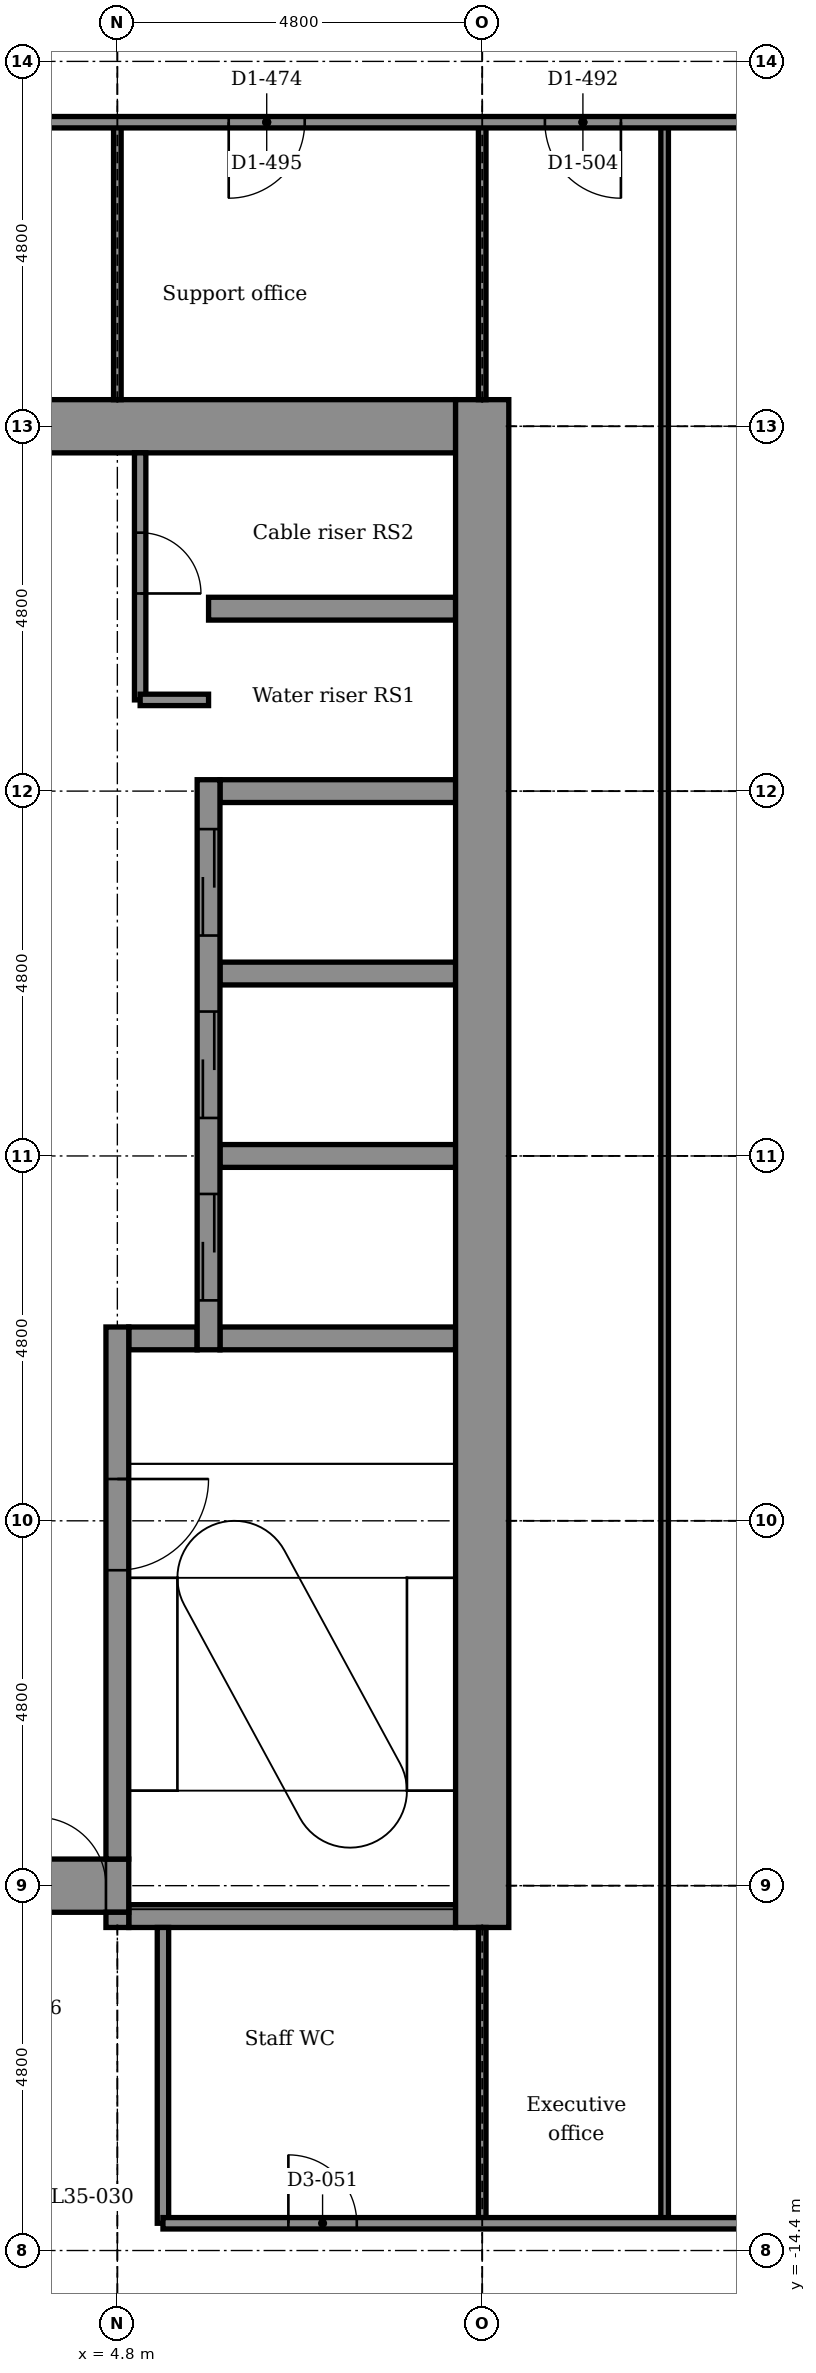
"""IFC4 building model, lengths in metres.
Left out: names, types, materials, properties, quantities, classifications, styles, units other than length and angle.
Written with IfcOpenShell. Run it as: python <this file> out.ifc"""

import sys

from ifc_helpers import new_model, si_unit, direction, frame, frame_2d, origin, place, context, subcontext, project, spatial, rectangle, extrude, element, fill, save


model = new_model("IFC4")
c1 = context("Model", 3, precision=1e-05, world=origin(), true_north=direction((0.0, 1.0)))
c2 = subcontext(c1, "Body", "Model", "MODEL_VIEW")
j1 = project(units=[si_unit("LENGTHUNIT", "METRE"), si_unit("PLANEANGLEUNIT", "RADIAN")], contexts=[c1])
p1 = place(None, origin())
s1 = spatial("IfcSite", under=j1, at=p1, CompositionType="ELEMENT")
p2 = place(p1, origin())
s2 = spatial("IfcBuilding", under=s1, at=p2, CompositionType="ELEMENT")
p3 = place(p2, frame((0.0, 0.0, 170.0)))
s3 = spatial("IfcBuildingStorey", under=s2, at=p3, CompositionType="ELEMENT", Elevation=170.0)
p4 = place(p3, frame((4.95, -10.0, -0.15), z_axis=(0.0, 0.0, 1.0), x_axis=(1.0, 0.0, 0.0)))
e1 = element("IfcWall", 1, at=p4, inside=s3, PredefinedType="STANDARD", context=c2, shape_type="SweptSolid", body=[
    extrude(rectangle(XDim=4.3, YDim=0.3, at=frame_2d((2.15, 0.0))), origin(), (0.0, 0.0, 1.0), 3.9),
])
p5 = place(p3, frame((-5.25, -9.6, -0.15), z_axis=(0.0, 0.0, 1.0), x_axis=(1.0, 0.0, 0.0)))
e2 = element("IfcWall", 2, at=p5, inside=s3, PredefinedType="SHEAR", context=c2, shape_type="SweptSolid", body=[
    extrude(rectangle(XDim=10.2, YDim=0.7, at=frame_2d((5.1, 0.0))), origin(), (0.0, 0.0, 1.0), 3.9),
])
p6 = place(p5, frame((9.0, 0.0, 0.15)))
e3 = element("IfcOpeningElement", 3, at=p6, cuts=e2, PredefinedType="OPENING", context=c2, shape_type="SweptSolid", body=[
    extrude(rectangle(XDim=0.9, YDim=2.1, at=frame_2d((0.45, 1.05))), frame((0.0, 0.36, 0.0), z_axis=(0.0, -1.0, 0.0), x_axis=(1.0, 0.0, 0.0)), (0.0, 0.0, 1.0), 0.72),
])
p7 = place(p3, frame((4.95, -2.4, -0.15), z_axis=(0.0, 0.0, 1.0), x_axis=(1.0, 0.0, 0.0)))
e4 = element("IfcWall", 4, at=p7, inside=s3, PredefinedType="STANDARD", context=c2, shape_type="SweptSolid", body=[
    extrude(rectangle(XDim=0.9, YDim=0.3, at=frame_2d((0.45, 0.0))), origin(), (0.0, 0.0, 1.0), 3.9),
])
for number, where, z_axis, x_axis in (
    (5, (6.15, -2.4, -0.15), (0.0, 0.0, 1.0), (1.0, 0.0, 0.0)),
    (6, (6.15, 0.0, -0.15), (0.0, 0.0, 1.0), (1.0, 0.0, 0.0)),
    (7, (6.15, 2.4, -0.15), (0.0, 0.0, 1.0), (1.0, 0.0, 0.0)),
    (8, (6.15, 4.8, -0.15), (0.0, 0.0, 1.0), (1.0, 0.0, 0.0)),
):
    element("IfcWall", number, at=place(p3, frame(where, z_axis=z_axis, x_axis=x_axis)), inside=s3, PredefinedType="STANDARD", context=c2, shape_type="SweptSolid", body=[
        extrude(rectangle(XDim=3.1, YDim=0.3, at=frame_2d((1.55, 0.0))), origin(), (0.0, 0.0, 1.0), 3.9),
    ])
p8 = place(p3, frame((6.0, 7.2, -0.15), z_axis=(0.0, 0.0, 1.0), x_axis=(1.0, 0.0, 0.0)))
e9 = element("IfcWall", 9, at=p8, inside=s3, PredefinedType="STANDARD", context=c2, shape_type="SweptSolid", body=[
    extrude(rectangle(XDim=3.25, YDim=0.3, at=frame_2d((1.625, 0.0))), origin(), (0.0, 0.0, 1.0), 3.9),
])
p9 = place(p3, frame((-5.25, 9.6, -0.15), z_axis=(0.0, 0.0, 1.0), x_axis=(1.0, 0.0, 0.0)))
e10 = element("IfcWall", 10, at=p9, inside=s3, PredefinedType="SHEAR", context=c2, shape_type="SweptSolid", body=[
    extrude(rectangle(XDim=14.5, YDim=0.7, at=frame_2d((7.25, 0.0))), origin(), (0.0, 0.0, 1.0), 3.9),
])
p10 = place(p9, frame((0.6, 0.0, 0.15)))
e11 = element("IfcOpeningElement", 11, at=p10, cuts=e10, PredefinedType="OPENING", context=c2, shape_type="SweptSolid", body=[
    extrude(rectangle(XDim=0.9, YDim=2.1, at=frame_2d((0.45, 1.05))), frame((0.0, 0.36, 0.0), z_axis=(0.0, -1.0, 0.0), x_axis=(1.0, 0.0, 0.0)), (0.0, 0.0, 1.0), 0.72),
])
p11 = place(p3, frame((4.8, -10.15, -0.15), z_axis=(0.0, 0.0, 1.0), x_axis=(0.0, 1.0, 0.0)))
e12 = element("IfcWall", 12, at=p11, inside=s3, PredefinedType="STANDARD", context=c2, shape_type="SweptSolid", body=[
    extrude(rectangle(XDim=0.2, YDim=0.3, at=frame_2d((0.1, 0.0))), origin(), (0.0, 0.0, 1.0), 3.9),
])
p12 = place(p3, frame((4.8, -9.25, -0.15), z_axis=(0.0, 0.0, 1.0), x_axis=(0.0, 1.0, 0.0)))
e13 = element("IfcWall", 13, at=p12, inside=s3, PredefinedType="STANDARD", context=c2, shape_type="SweptSolid", body=[
    extrude(rectangle(XDim=7.0, YDim=0.3, at=frame_2d((3.5, 0.0))), origin(), (0.0, 0.0, 1.0), 3.9),
])
p13 = place(p12, frame((3.8, 0.0, 0.15)))
e14 = element("IfcOpeningElement", 14, at=p13, cuts=e13, PredefinedType="OPENING", context=c2, shape_type="SweptSolid", body=[
    extrude(rectangle(XDim=1.2, YDim=2.1, at=frame_2d((0.6, 1.05))), frame((0.0, 0.16, 0.0), z_axis=(0.0, -1.0, 0.0), x_axis=(1.0, 0.0, 0.0)), (0.0, 0.0, 1.0), 0.32),
])
p14 = place(p3, frame((6.0, -2.55, -0.15), z_axis=(0.0, 0.0, 1.0), x_axis=(0.0, 1.0, 0.0)))
e15 = element("IfcWall", 15, at=p14, inside=s3, PredefinedType="STANDARD", context=c2, shape_type="SweptSolid", body=[
    extrude(rectangle(XDim=7.5, YDim=0.3, at=frame_2d((3.75, 0.0))), origin(), (0.0, 0.0, 1.0), 3.9),
])
p15 = place(p14, frame((0.65, 0.0, 0.15)))
e16 = element("IfcOpeningElement", 16, at=p15, cuts=e15, PredefinedType="OPENING", context=c2, shape_type="SweptSolid", body=[
    extrude(rectangle(XDim=1.4, YDim=2.1, at=frame_2d((0.7, 1.05))), frame((0.0, 0.16, 0.0), z_axis=(0.0, -1.0, 0.0), x_axis=(1.0, 0.0, 0.0)), (0.0, 0.0, 1.0), 0.32),
])
p16 = place(p14, frame((3.05, 0.0, 0.15)))
e17 = element("IfcOpeningElement", 17, at=p16, cuts=e15, PredefinedType="OPENING", context=c2, shape_type="SweptSolid", body=[
    extrude(rectangle(XDim=1.4, YDim=2.1, at=frame_2d((0.7, 1.05))), frame((0.0, 0.16, 0.0), z_axis=(0.0, -1.0, 0.0), x_axis=(1.0, 0.0, 0.0)), (0.0, 0.0, 1.0), 0.32),
])
p17 = place(p14, frame((5.45, 0.0, 0.15)))
e18 = element("IfcOpeningElement", 18, at=p17, cuts=e15, PredefinedType="OPENING", context=c2, shape_type="SweptSolid", body=[
    extrude(rectangle(XDim=1.4, YDim=2.1, at=frame_2d((0.7, 1.05))), frame((0.0, 0.16, 0.0), z_axis=(0.0, -1.0, 0.0), x_axis=(1.0, 0.0, 0.0)), (0.0, 0.0, 1.0), 0.32),
])
p18 = place(p3, frame((9.6, -10.15, -0.15), z_axis=(0.0, 0.0, 1.0), x_axis=(0.0, 1.0, 0.0)))
e19 = element("IfcWall", 19, at=p18, inside=s3, PredefinedType="SHEAR", context=c2, shape_type="SweptSolid", body=[
    extrude(rectangle(XDim=20.1, YDim=0.7, at=frame_2d((10.05, 0.0))), origin(), (0.0, 0.0, 1.0), 3.9),
])
p19 = place(p3, frame((12.0, -14.042, 0.0), z_axis=(0.0, 0.0, 1.0), x_axis=(0.0, 1.0, 0.0)))
e20 = element("IfcWall", 20, at=p19, inside=s3, PredefinedType="PARTITIONING", context=c2, shape_type="SweptSolid", body=[
    extrude(rectangle(XDim=27.642, YDim=0.1, at=frame_2d((13.821, 0.0))), origin(), (0.0, 0.0, 1.0), 3.75),
])
p20 = place(p3, frame((9.6, -14.042, 0.0), z_axis=(0.0, 0.0, 1.0), x_axis=(0.0, 1.0, 0.0)))
e21 = element("IfcWall", 21, at=p20, inside=s3, PredefinedType="PARTITIONING", context=c2, shape_type="SweptSolid", body=[
    extrude(rectangle(XDim=3.892, YDim=0.1, at=frame_2d((1.946, 0.0))), origin(), (0.0, 0.0, 1.0), 3.066),
])
p21 = place(p3, frame((9.6, 9.95, 0.0), z_axis=(0.0, 0.0, 1.0), x_axis=(0.0, 1.0, 0.0)))
e22 = element("IfcWall", 22, at=p21, inside=s3, PredefinedType="PARTITIONING", context=c2, shape_type="SweptSolid", body=[
    extrude(rectangle(XDim=3.65, YDim=0.1, at=frame_2d((1.825, 0.0))), origin(), (0.0, 0.0, 1.0), 3.066),
])
p22 = place(p3, frame((5.4, -14.042, 0.0), z_axis=(0.0, 0.0, 1.0), x_axis=(0.0, 1.0, 0.0)))
e23 = element("IfcWall", 23, at=p22, inside=s3, PredefinedType="PARTITIONING", context=c2, shape_type="SweptSolid", body=[
    extrude(rectangle(XDim=3.892, YDim=0.15, at=frame_2d((1.946, 0.0))), origin(), (0.0, 0.0, 1.0), 3.75),
])
p23 = place(p3, frame((5.1, 6.0, 0.0), z_axis=(0.0, 0.0, 1.0), x_axis=(0.0, 1.0, 0.0)))
e24 = element("IfcWall", 24, at=p23, inside=s3, PredefinedType="PARTITIONING", context=c2, shape_type="SweptSolid", body=[
    extrude(rectangle(XDim=3.25, YDim=0.15, at=frame_2d((1.625, 0.0))), origin(), (0.0, 0.0, 1.0), 3.75),
])
p24 = place(p23, frame((1.4, 0.0, 0.0)))
e25 = element("IfcOpeningElement", 25, at=p24, cuts=e24, PredefinedType="OPENING", context=c2, shape_type="SweptSolid", body=[
    extrude(rectangle(XDim=0.8, YDim=2.1, at=frame_2d((0.4, 1.05))), frame((0.0, 0.085, 0.0), z_axis=(0.0, -1.0, 0.0), x_axis=(1.0, 0.0, 0.0)), (0.0, 0.0, 1.0), 0.17),
])
p25 = place(p3, frame((4.8, 9.95, 0.0), z_axis=(0.0, 0.0, 1.0), x_axis=(0.0, 1.0, 0.0)))
e26 = element("IfcWall", 26, at=p25, inside=s3, PredefinedType="PARTITIONING", context=c2, shape_type="SweptSolid", body=[
    extrude(rectangle(XDim=3.65, YDim=0.1, at=frame_2d((1.825, 0.0))), origin(), (0.0, 0.0, 1.0), 3.066),
])
p26 = place(p3, frame((5.4, -14.042, 0.0), z_axis=(0.0, 0.0, 1.0), x_axis=(1.0, 0.0, 0.0)))
e27 = element("IfcWall", 27, at=p26, inside=s3, PredefinedType="PARTITIONING", context=c2, shape_type="SweptSolid", body=[
    extrude(rectangle(XDim=13.423, YDim=0.15, at=frame_2d((6.711, 0.0))), origin(), (0.0, 0.0, 1.0), 3.75),
])
p27 = place(p26, frame((1.65, 0.0, 0.0)))
e28 = element("IfcOpeningElement", 28, at=p27, cuts=e27, PredefinedType="OPENING", context=c2, shape_type="SweptSolid", body=[
    extrude(rectangle(XDim=0.9, YDim=2.1, at=frame_2d((0.45, 1.05))), frame((0.0, 0.085, 0.0), z_axis=(0.0, -1.0, 0.0), x_axis=(1.0, 0.0, 0.0)), (0.0, 0.0, 1.0), 0.17),
])
p28 = place(p3, frame((5.1, 6.0, 0.0), z_axis=(0.0, 0.0, 1.0), x_axis=(1.0, 0.0, 0.0)))
e29 = element("IfcWall", 29, at=p28, inside=s3, PredefinedType="PARTITIONING", context=c2, shape_type="SweptSolid", body=[
    extrude(rectangle(XDim=0.9, YDim=0.15, at=frame_2d((0.45, 0.0))), origin(), (0.0, 0.0, 1.0), 3.75),
])
p29 = place(p3, frame((-1.8, 13.6, 0.0), z_axis=(0.0, 0.0, 1.0), x_axis=(1.0, 0.0, 0.0)))
e30 = element("IfcWall", 30, at=p29, inside=s3, PredefinedType="PARTITIONING", context=c2, shape_type="SweptSolid", body=[
    extrude(rectangle(XDim=19.076, YDim=0.15, at=frame_2d((9.538, 0.0))), origin(), (0.0, 0.0, 1.0), 3.75),
])
p30 = place(p29, frame((2.8, 0.0, 0.0)))
e31 = element("IfcOpeningElement", 31, at=p30, cuts=e30, PredefinedType="OPENING", context=c2, shape_type="SweptSolid", body=[
    extrude(rectangle(XDim=1.0, YDim=2.1, at=frame_2d((0.5, 1.05))), frame((0.0, 0.085, 0.0), z_axis=(0.0, -1.0, 0.0), x_axis=(1.0, 0.0, 0.0)), (0.0, 0.0, 1.0), 0.17),
])
p31 = place(p29, frame((8.065, 0.0, 0.0)))
e32 = element("IfcOpeningElement", 32, at=p31, cuts=e30, PredefinedType="OPENING", context=c2, shape_type="SweptSolid", body=[
    extrude(rectangle(XDim=1.0, YDim=2.1, at=frame_2d((0.5, 1.05))), frame((0.0, 0.085, 0.0), z_axis=(0.0, -1.0, 0.0), x_axis=(1.0, 0.0, 0.0)), (0.0, 0.0, 1.0), 0.17),
])
p32 = place(p29, frame((12.225, 0.0, 0.0)))
e33 = element("IfcOpeningElement", 33, at=p32, cuts=e30, PredefinedType="OPENING", context=c2, shape_type="SweptSolid", body=[
    extrude(rectangle(XDim=1.0, YDim=2.1, at=frame_2d((0.5, 1.05))), frame((0.0, 0.085, 0.0), z_axis=(0.0, -1.0, 0.0), x_axis=(1.0, 0.0, 0.0)), (0.0, 0.0, 1.0), 0.17),
])
p33 = place(p29, frame((15.152, 0.0, 0.0)))
e34 = element("IfcOpeningElement", 34, at=p33, cuts=e30, PredefinedType="OPENING", context=c2, shape_type="SweptSolid", body=[
    extrude(rectangle(XDim=1.8, YDim=2.1, at=frame_2d((0.9, 1.05))), frame((0.0, 0.085, 0.0), z_axis=(0.0, -1.0, 0.0), x_axis=(1.0, 0.0, 0.0)), (0.0, 0.0, 1.0), 0.17),
])
p34 = place(p24, frame((0.8, 0.0, 0.0), z_axis=(0.0, 0.0, 1.0), x_axis=(-1.0, 0.0, 0.0)))
e35 = element("IfcDoor", 35, at=p34, inside=s3, OperationType="SINGLE_SWING_LEFT", PredefinedType="DOOR", context=c2, shape_type="SweptSolid", body=[
    extrude(rectangle(XDim=0.8, YDim=2.1, at=frame_2d((0.4, 1.05))), frame((0.0, 0.025, 0.0), z_axis=(0.0, -1.0, 0.0), x_axis=(1.0, 0.0, 0.0)), (0.0, 0.0, 1.0), 0.05),
])
fill(e25, e35)
p35 = place(p31, frame((1.0, 0.0, 0.0), z_axis=(0.0, 0.0, 1.0), x_axis=(-1.0, 0.0, 0.0)))
e36 = element("IfcDoor", 36, at=p35, inside=s3, OperationType="SINGLE_SWING_LEFT", PredefinedType="DOOR", context=c2, shape_type="SweptSolid", body=[
    extrude(rectangle(XDim=1.0, YDim=2.1, at=frame_2d((0.5, 1.05))), frame((0.0, 0.025, 0.0), z_axis=(0.0, -1.0, 0.0), x_axis=(1.0, 0.0, 0.0)), (0.0, 0.0, 1.0), 0.05),
])
fill(e32, e36)
p36 = place(p27, origin())
e37 = element("IfcDoor", 37, at=p36, inside=s3, OperationType="SINGLE_SWING_LEFT", PredefinedType="DOOR", context=c2, shape_type="SweptSolid", body=[
    extrude(rectangle(XDim=0.9, YDim=2.1, at=frame_2d((0.45, 1.05))), frame((0.0, 0.025, 0.0), z_axis=(0.0, -1.0, 0.0), x_axis=(1.0, 0.0, 0.0)), (0.0, 0.0, 1.0), 0.05),
])
fill(e28, e37)
p37 = place(p32, frame((1.0, 0.0, 0.0), z_axis=(0.0, 0.0, 1.0), x_axis=(-1.0, 0.0, 0.0)))
e38 = element("IfcDoor", 38, at=p37, inside=s3, OperationType="SINGLE_SWING_RIGHT", PredefinedType="DOOR", context=c2, shape_type="SweptSolid", body=[
    extrude(rectangle(XDim=1.0, YDim=2.1, at=frame_2d((0.5, 1.05))), frame((0.0, 0.025, 0.0), z_axis=(0.0, -1.0, 0.0), x_axis=(1.0, 0.0, 0.0)), (0.0, 0.0, 1.0), 0.05),
])
fill(e33, e38)
p38 = place(p15, origin())
e39 = element("IfcDoor", 39, at=p38, inside=s3, OperationType="DOUBLE_DOOR_SLIDING", PredefinedType="DOOR", context=c2, shape_type="SweptSolid", body=[
    extrude(rectangle(XDim=1.4, YDim=2.1, at=frame_2d((0.7, 1.05))), frame((0.0, 0.025, 0.0), z_axis=(0.0, -1.0, 0.0), x_axis=(1.0, 0.0, 0.0)), (0.0, 0.0, 1.0), 0.05),
])
fill(e16, e39)
p39 = place(p16, origin())
e40 = element("IfcDoor", 40, at=p39, inside=s3, OperationType="DOUBLE_DOOR_SLIDING", PredefinedType="DOOR", context=c2, shape_type="SweptSolid", body=[
    extrude(rectangle(XDim=1.4, YDim=2.1, at=frame_2d((0.7, 1.05))), frame((0.0, 0.025, 0.0), z_axis=(0.0, -1.0, 0.0), x_axis=(1.0, 0.0, 0.0)), (0.0, 0.0, 1.0), 0.05),
])
fill(e17, e40)
p40 = place(p17, origin())
e41 = element("IfcDoor", 41, at=p40, inside=s3, OperationType="DOUBLE_DOOR_SLIDING", PredefinedType="DOOR", context=c2, shape_type="SweptSolid", body=[
    extrude(rectangle(XDim=1.4, YDim=2.1, at=frame_2d((0.7, 1.05))), frame((0.0, 0.025, 0.0), z_axis=(0.0, -1.0, 0.0), x_axis=(1.0, 0.0, 0.0)), (0.0, 0.0, 1.0), 0.05),
])
fill(e18, e41)
p41 = place(p13, frame((1.2, 0.0, 0.0), z_axis=(0.0, 0.0, 1.0), x_axis=(-1.0, 0.0, 0.0)))
e42 = element("IfcDoor", 42, at=p41, inside=s3, OperationType="SINGLE_SWING_RIGHT", PredefinedType="DOOR", context=c2, shape_type="SweptSolid", body=[
    extrude(rectangle(XDim=1.2, YDim=2.1, at=frame_2d((0.6, 1.05))), frame((0.0, 0.025, 0.0), z_axis=(0.0, -1.0, 0.0), x_axis=(1.0, 0.0, 0.0)), (0.0, 0.0, 1.0), 0.05),
])
fill(e14, e42)
p42 = place(p6, origin())
e43 = element("IfcDoor", 43, at=p42, inside=s3, OperationType="SINGLE_SWING_LEFT", PredefinedType="DOOR", context=c2, shape_type="SweptSolid", body=[
    extrude(rectangle(XDim=0.9, YDim=2.1, at=frame_2d((0.45, 1.05))), frame((0.0, 0.025, 0.0), z_axis=(0.0, -1.0, 0.0), x_axis=(1.0, 0.0, 0.0)), (0.0, 0.0, 1.0), 0.05),
])
fill(e3, e43)
save(model, sys.argv[1])
